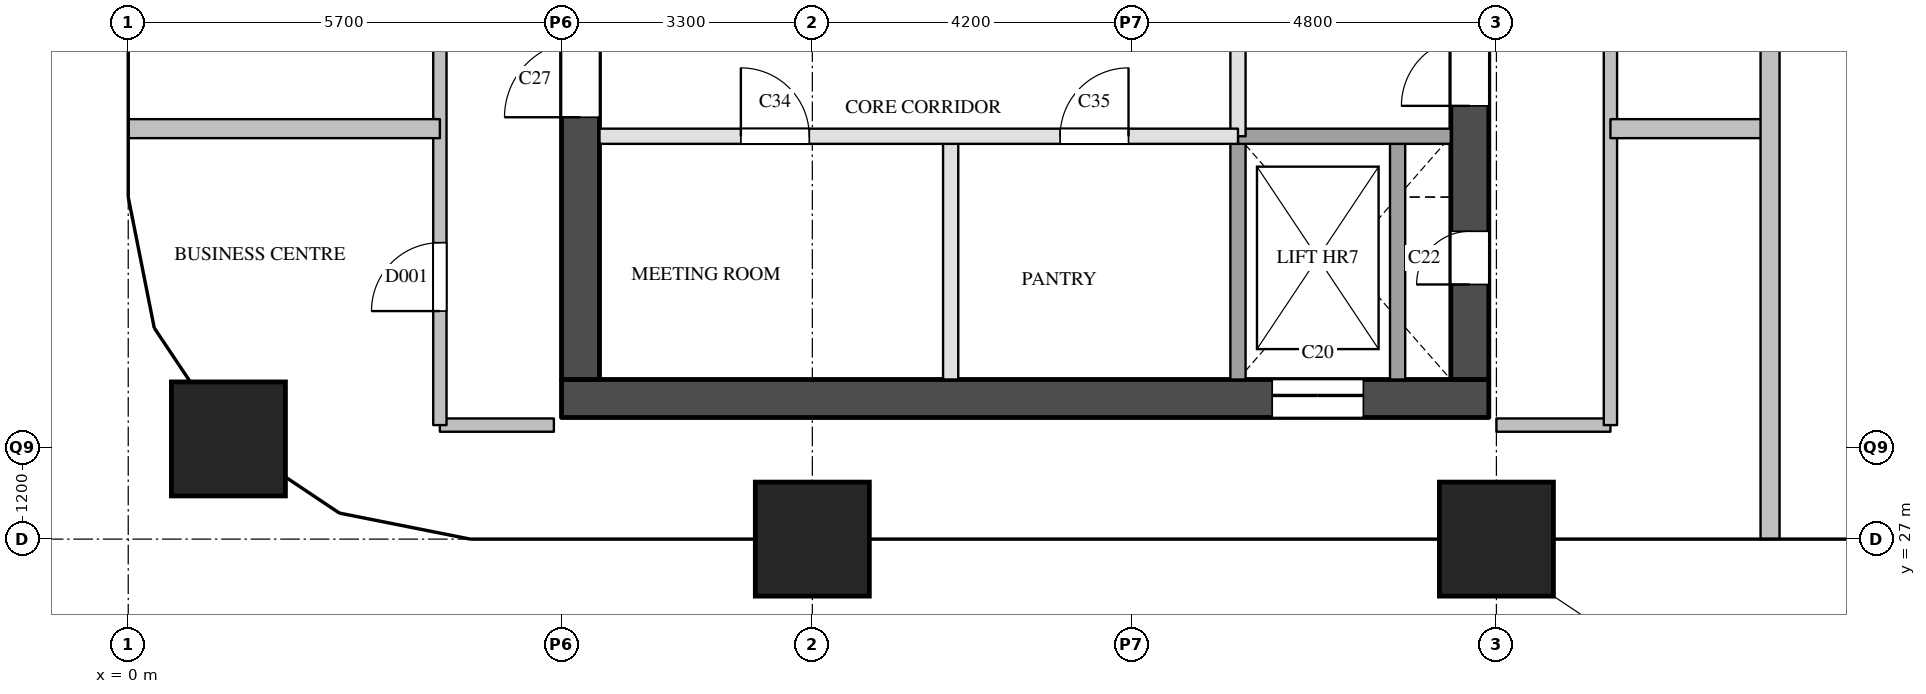
"""IFC4 building model, lengths in metres.
Left out: names, types, materials, properties, quantities, classifications, styles, units other than length and angle.
Written with IfcOpenShell. Run it as: python <this file> out.ifc"""

import sys

from ifc_helpers import new_model, si_unit, direction, frame, frame_2d, origin, origin_2d, place, context, subcontext, project, spatial, rectangle, extrude, element, fill, save


model = new_model("IFC4")
c1 = context("Model", 3, precision=1e-05, world=origin(), true_north=direction((0.0, 1.0)))
c2 = subcontext(c1, "Body", "Model", "MODEL_VIEW")
j1 = project(units=[si_unit("LENGTHUNIT", "METRE"), si_unit("PLANEANGLEUNIT", "RADIAN")], contexts=[c1])
p1 = place(None, origin())
s1 = spatial("IfcSite", under=j1, at=p1, CompositionType="ELEMENT")
p2 = place(p1, origin())
s2 = spatial("IfcBuilding", under=s1, at=p2, CompositionType="ELEMENT")
p3 = place(p2, frame((0.0, 0.0, 193.4)))
s3 = spatial("IfcBuildingStorey", under=s2, at=p3, CompositionType="ELEMENT", Elevation=193.4)
for number, where, z_axis, x_axis in (
    (1, (1.318, 28.318, 0.0), (0.0, 0.0, 1.0), (1.0, 0.0, 0.0)),
    (2, (9.0, 27.0, 0.0), (0.0, 0.0, 1.0), (1.0, 0.0, 0.0)),
    (3, (18.0, 27.0, 0.0), (0.0, 0.0, 1.0), (1.0, 0.0, 0.0)),
):
    element("IfcColumn", number, at=place(p3, frame(where, z_axis=z_axis, x_axis=x_axis)), inside=s3, PredefinedType="COLUMN", context=c2, shape_type="SweptSolid", body=[
        extrude(rectangle(XDim=1.5, YDim=1.5, at=origin_2d()), origin(), (0.0, 0.0, 1.0), 3.9),
    ])
p4 = place(p3, frame((5.7, 28.85, 0.0), z_axis=(0.0, 0.0, 1.0), x_axis=(1.0, 0.0, 0.0)))
e4 = element("IfcWall", 4, at=p4, inside=s3, PredefinedType="SHEAR", context=c2, shape_type="SweptSolid", body=[
    extrude(rectangle(XDim=12.2, YDim=0.5, at=frame_2d((6.1, 0.0))), origin(), (0.0, 0.0, 1.0), 3.4),
])
p5 = place(p4, frame((9.35, 0.0, 0.0)))
e5 = element("IfcOpeningElement", 5, at=p5, cuts=e4, PredefinedType="OPENING", context=c2, shape_type="SweptSolid", body=[
    extrude(rectangle(XDim=1.2, YDim=2.1, at=frame_2d((0.6, 1.05))), frame((0.0, 0.26, 0.0), z_axis=(0.0, -1.0, 0.0), x_axis=(1.0, 0.0, 0.0)), (0.0, 0.0, 1.0), 0.52),
])
p6 = place(p3, frame((5.95, 29.1, 0.0), z_axis=(0.0, 0.0, 1.0), x_axis=(0.0, 1.0, 0.0)))
e6 = element("IfcWall", 6, at=p6, inside=s3, PredefinedType="SHEAR", context=c2, shape_type="SweptSolid", body=[
    extrude(rectangle(XDim=20.3, YDim=0.5, at=frame_2d((10.15, 0.0))), origin(), (0.0, 0.0, 1.0), 3.4),
])
p7 = place(p6, frame((3.45, 0.0, 0.0)))
e7 = element("IfcOpeningElement", 7, at=p7, cuts=e6, PredefinedType="OPENING", context=c2, shape_type="SweptSolid", body=[
    extrude(rectangle(XDim=1.0, YDim=2.1, at=frame_2d((0.5, 1.05))), frame((0.0, 0.26, 0.0), z_axis=(0.0, -1.0, 0.0), x_axis=(1.0, 0.0, 0.0)), (0.0, 0.0, 1.0), 0.52),
])
p8 = place(p6, frame((16.4, 0.0, 0.0)))
e8 = element("IfcOpeningElement", 8, at=p8, cuts=e6, PredefinedType="OPENING", context=c2, shape_type="SweptSolid", body=[
    extrude(rectangle(XDim=1.0, YDim=2.1, at=frame_2d((0.5, 1.05))), frame((0.0, 0.26, 0.0), z_axis=(0.0, -1.0, 0.0), x_axis=(1.0, 0.0, 0.0)), (0.0, 0.0, 1.0), 0.52),
])
p9 = place(p3, frame((17.65, 29.1, 0.0), z_axis=(0.0, 0.0, 1.0), x_axis=(0.0, 1.0, 0.0)))
e9 = element("IfcWall", 9, at=p9, inside=s3, PredefinedType="SHEAR", context=c2, shape_type="SweptSolid", body=[
    extrude(rectangle(XDim=20.3, YDim=0.5, at=frame_2d((10.15, 0.0))), origin(), (0.0, 0.0, 1.0), 3.4),
])
p10 = place(p9, frame((1.25, 0.0, 0.0)))
e10 = element("IfcOpeningElement", 10, at=p10, cuts=e9, PredefinedType="OPENING", context=c2, shape_type="SweptSolid", body=[
    extrude(rectangle(XDim=0.7, YDim=2.1, at=frame_2d((0.35, 1.05))), frame((0.0, 0.26, 0.0), z_axis=(0.0, -1.0, 0.0), x_axis=(1.0, 0.0, 0.0)), (0.0, 0.0, 1.0), 0.52),
])
p11 = place(p9, frame((7.05, 0.0, 0.0)))
e11 = element("IfcOpeningElement", 11, at=p11, cuts=e9, PredefinedType="OPENING", context=c2, shape_type="SweptSolid", body=[
    extrude(rectangle(XDim=0.7, YDim=2.1, at=frame_2d((0.35, 1.05))), frame((0.0, 0.26, 0.0), z_axis=(0.0, -1.0, 0.0), x_axis=(1.0, 0.0, 0.0)), (0.0, 0.0, 1.0), 0.52),
])
p12 = place(p9, frame((3.6, 0.0, 0.0)))
e12 = element("IfcOpeningElement", 12, at=p12, cuts=e9, PredefinedType="OPENING", context=c2, shape_type="SweptSolid", body=[
    extrude(rectangle(XDim=1.8, YDim=2.1, at=frame_2d((0.9, 1.05))), frame((0.0, 0.26, 0.0), z_axis=(0.0, -1.0, 0.0), x_axis=(1.0, 0.0, 0.0)), (0.0, 0.0, 1.0), 0.52),
])
p13 = place(p3, frame((10.82, 29.1, 0.0), z_axis=(0.0, 0.0, 1.0), x_axis=(0.0, 1.0, 0.0)))
e13 = element("IfcWall", 13, at=p13, inside=s3, PredefinedType="PARTITIONING", context=c2, shape_type="SweptSolid", body=[
    extrude(rectangle(XDim=3.2, YDim=0.2, at=frame_2d((1.6, 0.0))), origin(), (0.0, 0.0, 1.0), 3.4),
])
p14 = place(p3, frame((14.6, 32.3, 0.0), z_axis=(0.0, 0.0, 1.0), x_axis=(0.0, 1.0, 0.0)))
e14 = element("IfcWall", 14, at=p14, inside=s3, PredefinedType="PARTITIONING", context=c2, shape_type="SweptSolid", body=[
    extrude(rectangle(XDim=2.6, YDim=0.2, at=frame_2d((1.3, 0.0))), origin(), (0.0, 0.0, 1.0), 3.4),
])
for number, where, z_axis, x_axis in (
    (15, (14.6, 29.1, 0.0), (0.0, 0.0, 1.0), (0.0, 1.0, 0.0)),
    (16, (16.7, 29.1, 0.0), (0.0, 0.0, 1.0), (0.0, 1.0, 0.0)),
):
    element("IfcWall", number, at=place(p3, frame(where, z_axis=z_axis, x_axis=x_axis)), inside=s3, PredefinedType="SOLIDWALL", context=c2, shape_type="SweptSolid", body=[
        extrude(rectangle(XDim=3.2, YDim=0.2, at=frame_2d((1.6, 0.0))), origin(), (0.0, 0.0, 1.0), 3.4),
    ])
p15 = place(p3, frame((6.2, 32.3, 0.0), z_axis=(0.0, 0.0, 1.0), x_axis=(1.0, 0.0, 0.0)))
e17 = element("IfcWall", 17, at=p15, inside=s3, PredefinedType="PARTITIONING", context=c2, shape_type="SweptSolid", body=[
    extrude(rectangle(XDim=8.4, YDim=0.2, at=frame_2d((4.2, 0.0))), origin(), (0.0, 0.0, 1.0), 3.4),
])
p16 = place(p15, frame((1.86, 0.0, 0.0)))
e18 = element("IfcOpeningElement", 18, at=p16, cuts=e17, PredefinedType="OPENING", context=c2, shape_type="SweptSolid", body=[
    extrude(rectangle(XDim=0.9, YDim=2.1, at=frame_2d((0.45, 1.05))), frame((0.0, 0.11, 0.0), z_axis=(0.0, -1.0, 0.0), x_axis=(1.0, 0.0, 0.0)), (0.0, 0.0, 1.0), 0.22),
])
p17 = place(p15, frame((6.06, 0.0, 0.0)))
e19 = element("IfcOpeningElement", 19, at=p17, cuts=e17, PredefinedType="OPENING", context=c2, shape_type="SweptSolid", body=[
    extrude(rectangle(XDim=0.9, YDim=2.1, at=frame_2d((0.45, 1.05))), frame((0.0, 0.11, 0.0), z_axis=(0.0, -1.0, 0.0), x_axis=(1.0, 0.0, 0.0)), (0.0, 0.0, 1.0), 0.22),
])
p18 = place(p3, frame((14.6, 32.3, 0.0), z_axis=(0.0, 0.0, 1.0), x_axis=(1.0, 0.0, 0.0)))
e20 = element("IfcWall", 20, at=p18, inside=s3, PredefinedType="SOLIDWALL", context=c2, shape_type="SweptSolid", body=[
    extrude(rectangle(XDim=2.8, YDim=0.2, at=frame_2d((1.4, 0.0))), origin(), (0.0, 0.0, 1.0), 3.4),
])
for number, where, z_axis, x_axis in (
    (21, (4.1, 28.5, 0.0), (0.0, 0.0, 1.0), (1.0, 0.0, 0.0)),
    (22, (18.0, 28.5, 0.0), (0.0, 0.0, 1.0), (1.0, 0.0, 0.0)),
):
    element("IfcWall", number, at=place(p3, frame(where, z_axis=z_axis, x_axis=x_axis)), inside=s3, PredefinedType="PARTITIONING", context=c2, shape_type="SweptSolid", body=[
        extrude(rectangle(XDim=1.5, YDim=0.175, at=frame_2d((0.75, 0.0))), origin(), (0.0, 0.0, 1.0), 3.4),
    ])
p19 = place(p3, frame((4.1, 28.5, 0.0), z_axis=(0.0, 0.0, 1.0), x_axis=(0.0, 1.0, 0.0)))
e23 = element("IfcWall", 23, at=p19, inside=s3, PredefinedType="PARTITIONING", context=c2, shape_type="SweptSolid", body=[
    extrude(rectangle(XDim=23.0, YDim=0.175, at=frame_2d((11.5, 0.0))), origin(), (0.0, 0.0, 1.0), 3.4),
])
p20 = place(p19, frame((1.5, 0.0, 0.0)))
e24 = element("IfcOpeningElement", 24, at=p20, cuts=e23, PredefinedType="OPENING", context=c2, shape_type="SweptSolid", body=[
    extrude(rectangle(XDim=0.9, YDim=2.1, at=frame_2d((0.45, 1.05))), frame((0.0, 0.097, 0.0), z_axis=(0.0, -1.0, 0.0), x_axis=(1.0, 0.0, 0.0)), (0.0, 0.0, 1.0), 0.195),
])
p21 = place(p19, frame((13.0, 0.0, 0.0)))
e25 = element("IfcOpeningElement", 25, at=p21, cuts=e23, PredefinedType="OPENING", context=c2, shape_type="SweptSolid", body=[
    extrude(rectangle(XDim=0.9, YDim=2.1, at=frame_2d((0.45, 1.05))), frame((0.0, 0.097, 0.0), z_axis=(0.0, -1.0, 0.0), x_axis=(1.0, 0.0, 0.0)), (0.0, 0.0, 1.0), 0.195),
])
p22 = place(p3, frame((19.5, 28.5, 0.0), z_axis=(0.0, 0.0, 1.0), x_axis=(0.0, 1.0, 0.0)))
e26 = element("IfcWall", 26, at=p22, inside=s3, PredefinedType="PARTITIONING", context=c2, shape_type="SweptSolid", body=[
    extrude(rectangle(XDim=13.8, YDim=0.175, at=frame_2d((6.9, 0.0))), origin(), (0.0, 0.0, 1.0), 3.4),
])
p23 = place(p22, frame((8.4, 0.0, 0.0)))
e27 = element("IfcOpeningElement", 27, at=p23, cuts=e26, PredefinedType="OPENING", context=c2, shape_type="SweptSolid", body=[
    extrude(rectangle(XDim=0.9, YDim=2.1, at=frame_2d((0.45, 1.05))), frame((0.0, 0.097, 0.0), z_axis=(0.0, -1.0, 0.0), x_axis=(1.0, 0.0, 0.0)), (0.0, 0.0, 1.0), 0.195),
])
p24 = place(p3, frame((0.0, 32.4, 0.0), z_axis=(0.0, 0.0, 1.0), x_axis=(1.0, 0.0, 0.0)))
e28 = element("IfcWall", 28, at=p24, inside=s3, PredefinedType="PARTITIONING", context=c2, shape_type="SweptSolid", body=[
    extrude(rectangle(XDim=4.1, YDim=0.25, at=frame_2d((2.05, 0.0))), origin(), (0.0, 0.0, 1.0), 2.4),
])
p25 = place(p3, frame((19.5, 32.4, 0.0), z_axis=(0.0, 0.0, 1.0), x_axis=(1.0, 0.0, 0.0)))
e29 = element("IfcWall", 29, at=p25, inside=s3, PredefinedType="PARTITIONING", context=c2, shape_type="SweptSolid", body=[
    extrude(rectangle(XDim=2.1, YDim=0.25, at=frame_2d((1.05, 0.0))), origin(), (0.0, 0.0, 1.0), 3.4),
])
p26 = place(p3, frame((21.6, 27.0, 0.0), z_axis=(0.0, 0.0, 1.0), x_axis=(0.0, 1.0, 0.0)))
e30 = element("IfcWall", 30, at=p26, inside=s3, PredefinedType="PARTITIONING", context=c2, shape_type="SweptSolid", body=[
    extrude(rectangle(XDim=15.3, YDim=0.25, at=frame_2d((7.65, 0.0))), origin(), (0.0, 0.0, 1.0), 2.4),
])
p27 = place(p5, origin())
e31 = element("IfcDoor", 31, at=p27, inside=s3, OperationType="SLIDING_TO_LEFT", PredefinedType="DOOR", context=c2, shape_type="SweptSolid", body=[
    extrude(rectangle(XDim=1.2, YDim=2.1, at=frame_2d((0.6, 1.05))), frame((0.0, 0.025, 0.0), z_axis=(0.0, -1.0, 0.0), x_axis=(1.0, 0.0, 0.0)), (0.0, 0.0, 1.0), 0.05),
])
fill(e5, e31)
p28 = place(p10, origin())
e32 = element("IfcDoor", 32, at=p28, inside=s3, OperationType="SINGLE_SWING_LEFT", PredefinedType="DOOR", context=c2, shape_type="SweptSolid", body=[
    extrude(rectangle(XDim=0.7, YDim=2.1, at=frame_2d((0.35, 1.05))), frame((0.0, 0.025, 0.0), z_axis=(0.0, -1.0, 0.0), x_axis=(1.0, 0.0, 0.0)), (0.0, 0.0, 1.0), 0.05),
])
fill(e10, e32)
p29 = place(p12, origin())
e33 = element("IfcDoor", 33, at=p29, inside=s3, OperationType="DOUBLE_DOOR_SINGLE_SWING", PredefinedType="DOOR", context=c2, shape_type="SweptSolid", body=[
    extrude(rectangle(XDim=1.8, YDim=2.1, at=frame_2d((0.9, 1.05))), frame((0.0, 0.025, 0.0), z_axis=(0.0, -1.0, 0.0), x_axis=(1.0, 0.0, 0.0)), (0.0, 0.0, 1.0), 0.05),
])
fill(e12, e33)
p30 = place(p7, origin())
e34 = element("IfcDoor", 34, at=p30, inside=s3, OperationType="SINGLE_SWING_LEFT", PredefinedType="DOOR", context=c2, shape_type="SweptSolid", body=[
    extrude(rectangle(XDim=1.0, YDim=2.1, at=frame_2d((0.5, 1.05))), frame((0.0, 0.025, 0.0), z_axis=(0.0, -1.0, 0.0), x_axis=(1.0, 0.0, 0.0)), (0.0, 0.0, 1.0), 0.05),
])
fill(e7, e34)
p31 = place(p16, origin())
e35 = element("IfcDoor", 35, at=p31, inside=s3, OperationType="SINGLE_SWING_LEFT", PredefinedType="DOOR", context=c2, shape_type="SweptSolid", body=[
    extrude(rectangle(XDim=0.9, YDim=2.1, at=frame_2d((0.45, 1.05))), frame((0.0, 0.025, 0.0), z_axis=(0.0, -1.0, 0.0), x_axis=(1.0, 0.0, 0.0)), (0.0, 0.0, 1.0), 0.05),
])
fill(e18, e35)
p32 = place(p17, origin())
e36 = element("IfcDoor", 36, at=p32, inside=s3, OperationType="SINGLE_SWING_RIGHT", PredefinedType="DOOR", context=c2, shape_type="SweptSolid", body=[
    extrude(rectangle(XDim=0.9, YDim=2.1, at=frame_2d((0.45, 1.05))), frame((0.0, 0.025, 0.0), z_axis=(0.0, -1.0, 0.0), x_axis=(1.0, 0.0, 0.0)), (0.0, 0.0, 1.0), 0.05),
])
fill(e19, e36)
p33 = place(p20, origin())
e37 = element("IfcDoor", 37, at=p33, inside=s3, OperationType="SINGLE_SWING_LEFT", PredefinedType="DOOR", context=c2, shape_type="SweptSolid", body=[
    extrude(rectangle(XDim=0.9, YDim=2.1, at=frame_2d((0.45, 1.05))), frame((0.0, 0.025, 0.0), z_axis=(0.0, -1.0, 0.0), x_axis=(1.0, 0.0, 0.0)), (0.0, 0.0, 1.0), 0.05),
])
fill(e24, e37)
save(model, sys.argv[1])
